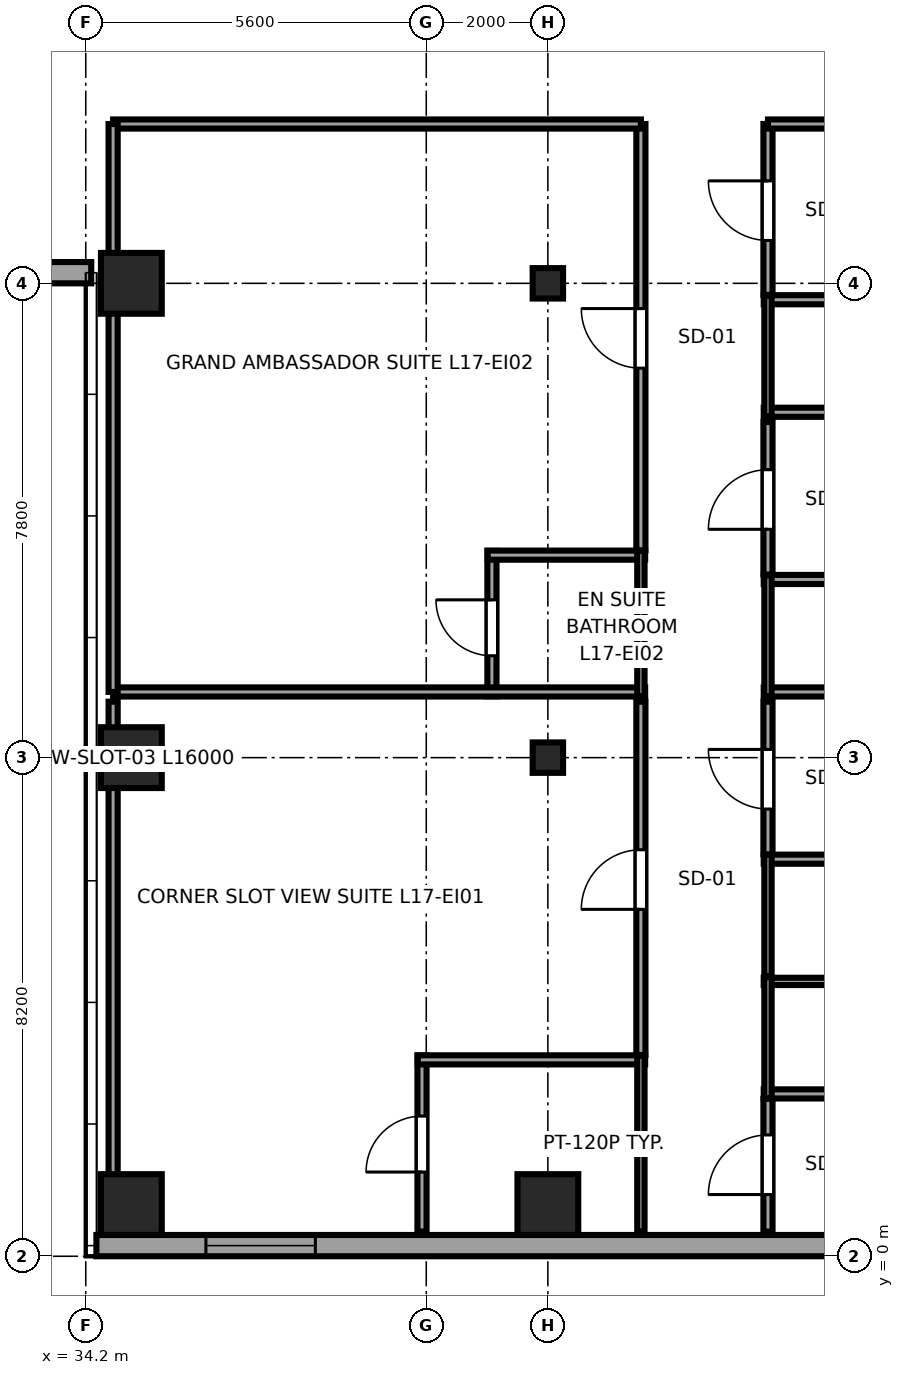
"""IFC4 building model, lengths in metres.
Left out: names, types, materials, properties, quantities, classifications, styles, units other than length and angle.
Written with IfcOpenShell. Run it as: python <this file> out.ifc"""

import sys

from ifc_helpers import new_model, si_unit, direction, frame, frame_2d, origin, origin_2d, place, context, subcontext, project, spatial, rectangle, i_section, extrude, source, transform, mapped, element, fill, save


model = new_model("IFC4")
c1 = context("Model", 3, precision=1e-05, world=origin(), true_north=direction((0.0, 1.0)))
c2 = subcontext(c1, "Body", "Model", "MODEL_VIEW")
j1 = project(units=[si_unit("LENGTHUNIT", "METRE"), si_unit("PLANEANGLEUNIT", "RADIAN")], contexts=[c1])
p1 = place(None, origin())
s1 = spatial("IfcSite", under=j1, at=p1, CompositionType="ELEMENT")
p2 = place(p1, origin())
s2 = spatial("IfcBuilding", under=s1, at=p2, CompositionType="ELEMENT")
p3 = place(p2, frame((0.0, 0.0, 71.05)))
s3 = spatial("IfcBuildingStorey", under=s2, at=p3, CompositionType="ELEMENT", Elevation=71.05)
m1 = source(origin(), c2, "Body", "SweptSolid", [
    extrude(rectangle(XDim=1.0, YDim=1.0, at=origin_2d()), origin(), (0.0, 0.0, 1.0), 3.55),
])
for number, where, z_axis, x_axis in (
    (1, (34.95, 0.85, 0.0), (0.0, 0.0, 1.0), (1.0, 0.0, 0.0)),
    (2, (34.95, 8.2, 0.0), (0.0, 0.0, 1.0), (1.0, 0.0, 0.0)),
    (3, (34.95, 16.0, 0.0), (0.0, 0.0, 1.0), (1.0, 0.0, 0.0)),
    (4, (41.8, 0.85, 0.0), (0.0, 0.0, 1.0), (1.0, 0.0, 0.0)),
):
    element("IfcColumn", number, at=place(p3, frame(where, z_axis=z_axis, x_axis=x_axis)), inside=s3, PredefinedType="COLUMN", context=c2, shape_type="MappedRepresentation", body=[
        mapped(m1, transform((0.0, 0.0, 0.0), x_axis=(1.0, 0.0, 0.0), y_axis=(0.0, 1.0, 0.0), z_axis=(0.0, 0.0, 1.0), scale=1.0)),
    ])
m2 = source(origin(), c2, "Body", "SweptSolid", [
    extrude(i_section(OverallWidth=0.5, OverallDepth=0.5, WebThickness=0.028, FlangeThickness=0.045, at=origin_2d()), origin(), (0.0, 0.0, 1.0), 3.55),
])
for number, where, z_axis, x_axis in (
    (5, (41.8, 8.2, 0.0), (0.0, 0.0, 1.0), (1.0, 0.0, 0.0)),
    (6, (41.8, 16.0, 0.0), (0.0, 0.0, 1.0), (1.0, 0.0, 0.0)),
):
    element("IfcColumn", number, at=place(p3, frame(where, z_axis=z_axis, x_axis=x_axis)), inside=s3, PredefinedType="COLUMN", context=c2, shape_type="MappedRepresentation", body=[
        mapped(m2, transform((0.0, 0.0, 0.0), x_axis=(1.0, 0.0, 0.0), y_axis=(0.0, 1.0, 0.0), z_axis=(0.0, 0.0, 1.0), scale=1.0)),
    ])
p4 = place(p3, frame((22.71, 16.175, 0.0), z_axis=(0.0, 0.0, 1.0), x_axis=(1.0, 0.0, 0.0)))
e7 = element("IfcWall", 7, at=p4, inside=s3, PredefinedType="SOLIDWALL", context=c2, shape_type="SweptSolid", body=[
    extrude(rectangle(XDim=11.58, YDim=0.35, at=frame_2d((5.79, 0.0))), origin(), (0.0, 0.0, 1.0), 2.748),
])
p5 = place(p4, frame((2.295, 0.0, 0.68)))
e8 = element("IfcOpeningElement", 8, at=p5, cuts=e7, PredefinedType="OPENING", context=c2, shape_type="SweptSolid", body=[
    extrude(rectangle(XDim=1.8, YDim=1.85, at=frame_2d((0.9, 0.925))), frame((0.0, 0.185, 0.0), z_axis=(0.0, -1.0, 0.0), x_axis=(1.0, 0.0, 0.0)), (0.0, 0.0, 1.0), 0.37),
])
p6 = place(p4, frame((7.485, 0.0, 0.68)))
e9 = element("IfcOpeningElement", 9, at=p6, cuts=e7, PredefinedType="OPENING", context=c2, shape_type="SweptSolid", body=[
    extrude(rectangle(XDim=1.8, YDim=1.85, at=frame_2d((0.9, 0.925))), frame((0.0, 0.185, 0.0), z_axis=(0.0, -1.0, 0.0), x_axis=(1.0, 0.0, 0.0)), (0.0, 0.0, 1.0), 0.37),
])
p7 = place(p3, frame((34.375, 0.175, 0.0), z_axis=(0.0, 0.0, 1.0), x_axis=(1.0, 0.0, 0.0)))
e10 = element("IfcWall", 10, at=p7, inside=s3, PredefinedType="SOLIDWALL", context=c2, shape_type="SweptSolid", body=[
    extrude(rectangle(XDim=18.008, YDim=0.35, at=frame_2d((9.004, 0.0))), origin(), (0.0, 0.0, 1.0), 3.37),
])
p8 = place(p7, frame((1.801, 0.0, 0.68)))
e11 = element("IfcOpeningElement", 11, at=p8, cuts=e10, PredefinedType="OPENING", context=c2, shape_type="SweptSolid", body=[
    extrude(rectangle(XDim=1.8, YDim=1.85, at=frame_2d((0.9, 0.925))), frame((0.0, 0.185, 0.0), z_axis=(0.0, -1.0, 0.0), x_axis=(1.0, 0.0, 0.0)), (0.0, 0.0, 1.0), 0.37),
])
p9 = place(p7, frame((12.825, 0.0, 0.62)))
e12 = element("IfcOpeningElement", 12, at=p9, cuts=e10, PredefinedType="OPENING", context=c2, shape_type="SweptSolid", body=[
    extrude(rectangle(XDim=1.5, YDim=1.55, at=frame_2d((0.75, 0.775))), frame((0.0, 0.185, 0.0), z_axis=(0.0, -1.0, 0.0), x_axis=(1.0, 0.0, 0.0)), (0.0, 0.0, 1.0), 0.37),
])
p10 = place(p3, frame((39.73, 0.405, 0.0), z_axis=(0.0, 0.0, 1.0), x_axis=(0.0, 1.0, 0.0)))
e13 = element("IfcWall", 13, at=p10, inside=s3, PredefinedType="PARTITIONING", context=c2, shape_type="SweptSolid", body=[
    extrude(rectangle(XDim=2.895, YDim=0.15, at=frame_2d((1.448, 0.0))), origin(), (0.0, 0.0, 1.0), 3.37),
])
p11 = place(p10, frame((0.98, 0.0, 0.0)))
e14 = element("IfcOpeningElement", 14, at=p11, cuts=e13, PredefinedType="OPENING", context=c2, shape_type="SweptSolid", body=[
    extrude(rectangle(XDim=0.92, YDim=2.01, at=frame_2d((0.46, 1.005))), frame((0.0, 0.085, 0.0), z_axis=(0.0, -1.0, 0.0), x_axis=(1.0, 0.0, 0.0)), (0.0, 0.0, 1.0), 0.17),
])
p12 = place(p3, frame((39.66, 3.23, 0.0), z_axis=(0.0, 0.0, 1.0), x_axis=(1.0, 0.0, 0.0)))
e15 = element("IfcWall", 15, at=p12, inside=s3, PredefinedType="PARTITIONING", context=c2, shape_type="SweptSolid", body=[
    extrude(rectangle(XDim=3.74, YDim=0.15, at=frame_2d((1.87, 0.0))), origin(), (0.0, 0.0, 1.0), 3.37),
])
p13 = place(p3, frame((43.33, 0.405, 0.0), z_axis=(0.0, 0.0, 1.0), x_axis=(0.0, 1.0, 0.0)))
e16 = element("IfcWall", 16, at=p13, inside=s3, PredefinedType="PLUMBINGWALL", context=c2, shape_type="SweptSolid", body=[
    extrude(rectangle(XDim=2.895, YDim=0.12, at=frame_2d((1.448, 0.0))), origin(), (0.0, 0.0, 1.0), 3.37),
])
p14 = place(p3, frame((40.88, 9.21, 0.0), z_axis=(0.0, 0.0, 1.0), x_axis=(0.0, 1.0, 0.0)))
e17 = element("IfcWall", 17, at=p14, inside=s3, PredefinedType="PARTITIONING", context=c2, shape_type="SweptSolid", body=[
    extrude(rectangle(XDim=2.39, YDim=0.15, at=frame_2d((1.195, 0.0))), origin(), (0.0, 0.0, 1.0), 3.37),
])
p15 = place(p14, frame((0.665, 0.0, 0.0)))
e18 = element("IfcOpeningElement", 18, at=p15, cuts=e17, PredefinedType="OPENING", context=c2, shape_type="SweptSolid", body=[
    extrude(rectangle(XDim=0.92, YDim=2.01, at=frame_2d((0.46, 1.005))), frame((0.0, 0.085, 0.0), z_axis=(0.0, -1.0, 0.0), x_axis=(1.0, 0.0, 0.0)), (0.0, 0.0, 1.0), 0.17),
])
p16 = place(p3, frame((34.65, 9.28, 0.0), z_axis=(0.0, 0.0, 1.0), x_axis=(1.0, 0.0, 0.0)))
e19 = element("IfcWall", 19, at=p16, inside=s3, PredefinedType="PARTITIONING", context=c2, shape_type="SweptSolid", body=[
    extrude(rectangle(XDim=8.75, YDim=0.15, at=frame_2d((4.375, 0.0))), origin(), (0.0, 0.0, 1.0), 3.37),
])
p17 = place(p3, frame((40.81, 11.53, 0.0), z_axis=(0.0, 0.0, 1.0), x_axis=(1.0, 0.0, 0.0)))
e20 = element("IfcWall", 20, at=p17, inside=s3, PredefinedType="PARTITIONING", context=c2, shape_type="SweptSolid", body=[
    extrude(rectangle(XDim=2.59, YDim=0.15, at=frame_2d((1.295, 0.0))), origin(), (0.0, 0.0, 1.0), 3.37),
])
p18 = place(p3, frame((43.33, 9.21, 0.0), z_axis=(0.0, 0.0, 1.0), x_axis=(0.0, 1.0, 0.0)))
e21 = element("IfcWall", 21, at=p18, inside=s3, PredefinedType="PLUMBINGWALL", context=c2, shape_type="SweptSolid", body=[
    extrude(rectangle(XDim=2.39, YDim=0.12, at=frame_2d((1.195, 0.0))), origin(), (0.0, 0.0, 1.0), 3.37),
])
p19 = place(p3, frame((45.35, 2.67, 0.0), z_axis=(0.0, 0.0, 1.0), x_axis=(1.0, 0.0, 0.0)))
e22 = element("IfcWall", 22, at=p19, inside=s3, PredefinedType="PARTITIONING", context=c2, shape_type="SweptSolid", body=[
    extrude(rectangle(XDim=2.59, YDim=0.15, at=frame_2d((1.295, 0.0))), origin(), (0.0, 0.0, 1.0), 3.37),
])
p20 = place(p3, frame((45.35, 4.52, 0.0), z_axis=(0.0, 0.0, 1.0), x_axis=(1.0, 0.0, 0.0)))
e23 = element("IfcWall", 23, at=p20, inside=s3, PredefinedType="PLUMBINGWALL", context=c2, shape_type="SweptSolid", body=[
    extrude(rectangle(XDim=2.59, YDim=0.12, at=frame_2d((1.295, 0.0))), origin(), (0.0, 0.0, 1.0), 3.37),
])
p21 = place(p3, frame((45.42, 2.6, 0.0), z_axis=(0.0, 0.0, 1.0), x_axis=(0.0, 1.0, 0.0)))
e24 = element("IfcWall", 24, at=p21, inside=s3, PredefinedType="PLUMBINGWALL", context=c2, shape_type="SweptSolid", body=[
    extrude(rectangle(XDim=1.99, YDim=0.12, at=frame_2d((0.995, 0.0))), origin(), (0.0, 0.0, 1.0), 3.37),
])
p22 = place(p3, frame((45.35, 6.53, 0.0), z_axis=(0.0, 0.0, 1.0), x_axis=(1.0, 0.0, 0.0)))
e25 = element("IfcWall", 25, at=p22, inside=s3, PredefinedType="PARTITIONING", context=c2, shape_type="SweptSolid", body=[
    extrude(rectangle(XDim=2.59, YDim=0.15, at=frame_2d((1.295, 0.0))), origin(), (0.0, 0.0, 1.0), 3.37),
])
p23 = place(p3, frame((45.42, 4.61, 0.0), z_axis=(0.0, 0.0, 1.0), x_axis=(0.0, 1.0, 0.0)))
e26 = element("IfcWall", 26, at=p23, inside=s3, PredefinedType="PLUMBINGWALL", context=c2, shape_type="SweptSolid", body=[
    extrude(rectangle(XDim=1.99, YDim=0.12, at=frame_2d((0.995, 0.0))), origin(), (0.0, 0.0, 1.0), 3.37),
])
p24 = place(p3, frame((45.35, 9.28, 0.0), z_axis=(0.0, 0.0, 1.0), x_axis=(1.0, 0.0, 0.0)))
e27 = element("IfcWall", 27, at=p24, inside=s3, PredefinedType="PARTITIONING", context=c2, shape_type="SweptSolid", body=[
    extrude(rectangle(XDim=11.245, YDim=0.15, at=frame_2d((5.623, 0.0))), origin(), (0.0, 0.0, 1.0), 3.37),
])
p25 = place(p3, frame((45.35, 11.13, 0.0), z_axis=(0.0, 0.0, 1.0), x_axis=(1.0, 0.0, 0.0)))
e28 = element("IfcWall", 28, at=p25, inside=s3, PredefinedType="PARTITIONING", context=c2, shape_type="SweptSolid", body=[
    extrude(rectangle(XDim=2.59, YDim=0.15, at=frame_2d((1.295, 0.0))), origin(), (0.0, 0.0, 1.0), 3.37),
])
p26 = place(p3, frame((45.42, 9.21, 0.0), z_axis=(0.0, 0.0, 1.0), x_axis=(0.0, 1.0, 0.0)))
e29 = element("IfcWall", 29, at=p26, inside=s3, PredefinedType="PLUMBINGWALL", context=c2, shape_type="SweptSolid", body=[
    extrude(rectangle(XDim=1.99, YDim=0.12, at=frame_2d((0.995, 0.0))), origin(), (0.0, 0.0, 1.0), 3.37),
])
p27 = place(p3, frame((45.35, 13.88, 0.0), z_axis=(0.0, 0.0, 1.0), x_axis=(1.0, 0.0, 0.0)))
e30 = element("IfcWall", 30, at=p27, inside=s3, PredefinedType="PARTITIONING", context=c2, shape_type="SweptSolid", body=[
    extrude(rectangle(XDim=11.245, YDim=0.15, at=frame_2d((5.623, 0.0))), origin(), (0.0, 0.0, 1.0), 3.37),
])
p28 = place(p3, frame((45.35, 15.73, 0.0), z_axis=(0.0, 0.0, 1.0), x_axis=(1.0, 0.0, 0.0)))
e31 = element("IfcWall", 31, at=p28, inside=s3, PredefinedType="PARTITIONING", context=c2, shape_type="SweptSolid", body=[
    extrude(rectangle(XDim=2.59, YDim=0.15, at=frame_2d((1.295, 0.0))), origin(), (0.0, 0.0, 1.0), 3.37),
])
p29 = place(p3, frame((45.42, 13.81, 0.0), z_axis=(0.0, 0.0, 1.0), x_axis=(0.0, 1.0, 0.0)))
e32 = element("IfcWall", 32, at=p29, inside=s3, PredefinedType="PLUMBINGWALL", context=c2, shape_type="SweptSolid", body=[
    extrude(rectangle(XDim=1.99, YDim=0.12, at=frame_2d((0.995, 0.0))), origin(), (0.0, 0.0, 1.0), 3.37),
])
p30 = place(p3, frame((43.33, 3.31, 0.0), z_axis=(0.0, 0.0, 1.0), x_axis=(0.0, 1.0, 0.0)))
e33 = element("IfcWall", 33, at=p30, inside=s3, PredefinedType="PARTITIONING", context=c2, shape_type="SweptSolid", body=[
    extrude(rectangle(XDim=5.81, YDim=0.15, at=frame_2d((2.905, 0.0))), origin(), (0.0, 0.0, 1.0), 3.37),
])
p31 = place(p30, frame((2.395, 0.0, 0.0)))
e34 = element("IfcOpeningElement", 34, at=p31, cuts=e33, PredefinedType="OPENING", context=c2, shape_type="SweptSolid", body=[
    extrude(rectangle(XDim=0.98, YDim=2.12, at=frame_2d((0.49, 1.06))), frame((0.0, 0.085, 0.0), z_axis=(0.0, -1.0, 0.0), x_axis=(1.0, 0.0, 0.0)), (0.0, 0.0, 1.0), 0.17),
])
p32 = place(p3, frame((34.65, 0.405, 0.0), z_axis=(0.0, 0.0, 1.0), x_axis=(0.0, 1.0, 0.0)))
e35 = element("IfcWall", 35, at=p32, inside=s3, PredefinedType="PARTITIONING", context=c2, shape_type="SweptSolid", body=[
    extrude(rectangle(XDim=8.715, YDim=0.15, at=frame_2d((4.357, 0.0))), origin(), (0.0, 0.0, 1.0), 3.37),
])
p33 = place(p3, frame((43.33, 11.61, 0.0), z_axis=(0.0, 0.0, 1.0), x_axis=(0.0, 1.0, 0.0)))
e36 = element("IfcWall", 36, at=p33, inside=s3, PredefinedType="PARTITIONING", context=c2, shape_type="SweptSolid", body=[
    extrude(rectangle(XDim=7.01, YDim=0.15, at=frame_2d((3.505, 0.0))), origin(), (0.0, 0.0, 1.0), 3.37),
])
p34 = place(p33, frame((2.995, 0.0, 0.0)))
e37 = element("IfcOpeningElement", 37, at=p34, cuts=e36, PredefinedType="OPENING", context=c2, shape_type="SweptSolid", body=[
    extrude(rectangle(XDim=0.98, YDim=2.12, at=frame_2d((0.49, 1.06))), frame((0.0, 0.085, 0.0), z_axis=(0.0, -1.0, 0.0), x_axis=(1.0, 0.0, 0.0)), (0.0, 0.0, 1.0), 0.17),
])
p35 = place(p3, frame((34.65, 18.62, 0.0), z_axis=(0.0, 0.0, 1.0), x_axis=(1.0, 0.0, 0.0)))
e38 = element("IfcWall", 38, at=p35, inside=s3, PredefinedType="PARTITIONING", context=c2, shape_type="SweptSolid", body=[
    extrude(rectangle(XDim=8.68, YDim=0.15, at=frame_2d((4.34, 0.0))), origin(), (0.0, 0.0, 1.0), 3.37),
])
p36 = place(p3, frame((34.65, 9.28, 0.0), z_axis=(0.0, 0.0, 1.0), x_axis=(0.0, 1.0, 0.0)))
e39 = element("IfcWall", 39, at=p36, inside=s3, PredefinedType="PARTITIONING", context=c2, shape_type="SweptSolid", body=[
    extrude(rectangle(XDim=9.34, YDim=0.15, at=frame_2d((4.67, 0.0))), origin(), (0.0, 0.0, 1.0), 3.37),
])
p37 = place(p3, frame((45.42, 0.405, 0.0), z_axis=(0.0, 0.0, 1.0), x_axis=(0.0, 1.0, 0.0)))
e40 = element("IfcWall", 40, at=p37, inside=s3, PredefinedType="PARTITIONING", context=c2, shape_type="SweptSolid", body=[
    extrude(rectangle(XDim=2.185, YDim=0.15, at=frame_2d((1.093, 0.0))), origin(), (0.0, 0.0, 1.0), 3.37),
])
p38 = place(p37, frame((0.61, 0.0, 0.0)))
e41 = element("IfcOpeningElement", 41, at=p38, cuts=e40, PredefinedType="OPENING", context=c2, shape_type="SweptSolid", body=[
    extrude(rectangle(XDim=0.98, YDim=2.12, at=frame_2d((0.49, 1.06))), frame((0.0, 0.085, 0.0), z_axis=(0.0, -1.0, 0.0), x_axis=(1.0, 0.0, 0.0)), (0.0, 0.0, 1.0), 0.17),
])
p39 = place(p3, frame((45.42, 6.61, 0.0), z_axis=(0.0, 0.0, 1.0), x_axis=(0.0, 1.0, 0.0)))
e42 = element("IfcWall", 42, at=p39, inside=s3, PredefinedType="PARTITIONING", context=c2, shape_type="SweptSolid", body=[
    extrude(rectangle(XDim=2.51, YDim=0.15, at=frame_2d((1.255, 0.0))), origin(), (0.0, 0.0, 1.0), 3.37),
])
p40 = place(p39, frame((0.745, 0.0, 0.0)))
e43 = element("IfcOpeningElement", 43, at=p40, cuts=e42, PredefinedType="OPENING", context=c2, shape_type="SweptSolid", body=[
    extrude(rectangle(XDim=0.98, YDim=2.12, at=frame_2d((0.49, 1.06))), frame((0.0, 0.085, 0.0), z_axis=(0.0, -1.0, 0.0), x_axis=(1.0, 0.0, 0.0)), (0.0, 0.0, 1.0), 0.17),
])
p41 = place(p3, frame((45.42, 11.21, 0.0), z_axis=(0.0, 0.0, 1.0), x_axis=(0.0, 1.0, 0.0)))
e44 = element("IfcWall", 44, at=p41, inside=s3, PredefinedType="PARTITIONING", context=c2, shape_type="SweptSolid", body=[
    extrude(rectangle(XDim=2.51, YDim=0.15, at=frame_2d((1.255, 0.0))), origin(), (0.0, 0.0, 1.0), 3.37),
])
p42 = place(p41, frame((0.745, 0.0, 0.0)))
e45 = element("IfcOpeningElement", 45, at=p42, cuts=e44, PredefinedType="OPENING", context=c2, shape_type="SweptSolid", body=[
    extrude(rectangle(XDim=0.98, YDim=2.12, at=frame_2d((0.49, 1.06))), frame((0.0, 0.085, 0.0), z_axis=(0.0, -1.0, 0.0), x_axis=(1.0, 0.0, 0.0)), (0.0, 0.0, 1.0), 0.17),
])
p43 = place(p3, frame((45.42, 15.81, 0.0), z_axis=(0.0, 0.0, 1.0), x_axis=(0.0, 1.0, 0.0)))
e46 = element("IfcWall", 46, at=p43, inside=s3, PredefinedType="PARTITIONING", context=c2, shape_type="SweptSolid", body=[
    extrude(rectangle(XDim=2.81, YDim=0.15, at=frame_2d((1.405, 0.0))), origin(), (0.0, 0.0, 1.0), 3.37),
])
p44 = place(p43, frame((0.895, 0.0, 0.0)))
e47 = element("IfcOpeningElement", 47, at=p44, cuts=e46, PredefinedType="OPENING", context=c2, shape_type="SweptSolid", body=[
    extrude(rectangle(XDim=0.98, YDim=2.12, at=frame_2d((0.49, 1.06))), frame((0.0, 0.085, 0.0), z_axis=(0.0, -1.0, 0.0), x_axis=(1.0, 0.0, 0.0)), (0.0, 0.0, 1.0), 0.17),
])
p45 = place(p3, frame((45.42, 18.62, 0.0), z_axis=(0.0, 0.0, 1.0), x_axis=(1.0, 0.0, 0.0)))
e48 = element("IfcWall", 48, at=p45, inside=s3, PredefinedType="PARTITIONING", context=c2, shape_type="SweptSolid", body=[
    extrude(rectangle(XDim=11.175, YDim=0.15, at=frame_2d((5.587, 0.0))), origin(), (0.0, 0.0, 1.0), 3.37),
])
m3 = source(origin(), c2, "Body", "SweptSolid", [
    extrude(rectangle(XDim=1.8, YDim=1.85, at=frame_2d((0.9, 0.925))), frame((0.0, 0.09, 0.0), z_axis=(0.0, -1.0, 0.0), x_axis=(1.0, 0.0, 0.0)), (0.0, 0.0, 1.0), 0.06),
])
p46 = place(p8, origin())
e49 = element("IfcWindow", 49, at=p46, inside=s3, PartitioningType="TRIPLE_PANEL_HORIZONTAL", PredefinedType="WINDOW", context=c2, shape_type="MappedRepresentation", body=[
    mapped(m3, transform((0.0, 0.0, 0.0), x_axis=(1.0, 0.0, 0.0), y_axis=(0.0, 1.0, 0.0), z_axis=(0.0, 0.0, 1.0), scale=1.0)),
])
fill(e11, e49)
m4 = source(origin(), c2, "Body", "SweptSolid", [
    extrude(rectangle(XDim=0.92, YDim=2.01, at=frame_2d((0.46, 1.005))), frame((0.0, 0.025, 0.0), z_axis=(0.0, -1.0, 0.0), x_axis=(1.0, 0.0, 0.0)), (0.0, 0.0, 1.0), 0.05),
])
p47 = place(p11, origin())
e50 = element("IfcDoor", 50, at=p47, inside=s3, OperationType="SINGLE_SWING_LEFT", PredefinedType="DOOR", context=c2, shape_type="MappedRepresentation", body=[
    mapped(m4, transform((0.0, 0.0, 0.0), x_axis=(1.0, 0.0, 0.0), y_axis=(0.0, 1.0, 0.0), z_axis=(0.0, 0.0, 1.0), scale=1.0)),
])
fill(e14, e50)
p48 = place(p15, origin())
e51 = element("IfcDoor", 51, at=p48, inside=s3, OperationType="SINGLE_SWING_RIGHT", PredefinedType="DOOR", context=c2, shape_type="MappedRepresentation", body=[
    mapped(m4, transform((0.0, 0.0, 0.0), x_axis=(1.0, 0.0, 0.0), y_axis=(0.0, 1.0, 0.0), z_axis=(0.0, 0.0, 1.0), scale=1.0)),
])
fill(e18, e51)
m5 = source(origin(), c2, "Body", "SweptSolid", [
    extrude(rectangle(XDim=0.98, YDim=2.12, at=frame_2d((0.49, 1.06))), frame((0.0, 0.025, 0.0), z_axis=(0.0, -1.0, 0.0), x_axis=(1.0, 0.0, 0.0)), (0.0, 0.0, 1.0), 0.05),
])
p49 = place(p31, origin())
e52 = element("IfcDoor", 52, at=p49, inside=s3, OperationType="SINGLE_SWING_LEFT", PredefinedType="DOOR", context=c2, shape_type="MappedRepresentation", body=[
    mapped(m5, transform((0.0, 0.0, 0.0), x_axis=(1.0, 0.0, 0.0), y_axis=(0.0, 1.0, 0.0), z_axis=(0.0, 0.0, 1.0), scale=1.0)),
])
fill(e34, e52)
p50 = place(p34, origin())
e53 = element("IfcDoor", 53, at=p50, inside=s3, OperationType="SINGLE_SWING_RIGHT", PredefinedType="DOOR", context=c2, shape_type="MappedRepresentation", body=[
    mapped(m5, transform((0.0, 0.0, 0.0), x_axis=(1.0, 0.0, 0.0), y_axis=(0.0, 1.0, 0.0), z_axis=(0.0, 0.0, 1.0), scale=1.0)),
])
fill(e37, e53)
p51 = place(p38, origin())
e54 = element("IfcDoor", 54, at=p51, inside=s3, OperationType="SINGLE_SWING_LEFT", PredefinedType="DOOR", context=c2, shape_type="MappedRepresentation", body=[
    mapped(m5, transform((0.0, 0.0, 0.0), x_axis=(1.0, 0.0, 0.0), y_axis=(0.0, 1.0, 0.0), z_axis=(0.0, 0.0, 1.0), scale=1.0)),
])
fill(e41, e54)
p52 = place(p40, origin())
e55 = element("IfcDoor", 55, at=p52, inside=s3, OperationType="SINGLE_SWING_RIGHT", PredefinedType="DOOR", context=c2, shape_type="MappedRepresentation", body=[
    mapped(m5, transform((0.0, 0.0, 0.0), x_axis=(1.0, 0.0, 0.0), y_axis=(0.0, 1.0, 0.0), z_axis=(0.0, 0.0, 1.0), scale=1.0)),
])
fill(e43, e55)
p53 = place(p42, origin())
e56 = element("IfcDoor", 56, at=p53, inside=s3, OperationType="SINGLE_SWING_LEFT", PredefinedType="DOOR", context=c2, shape_type="MappedRepresentation", body=[
    mapped(m5, transform((0.0, 0.0, 0.0), x_axis=(1.0, 0.0, 0.0), y_axis=(0.0, 1.0, 0.0), z_axis=(0.0, 0.0, 1.0), scale=1.0)),
])
fill(e45, e56)
p54 = place(p44, origin())
e57 = element("IfcDoor", 57, at=p54, inside=s3, OperationType="SINGLE_SWING_RIGHT", PredefinedType="DOOR", context=c2, shape_type="MappedRepresentation", body=[
    mapped(m5, transform((0.0, 0.0, 0.0), x_axis=(1.0, 0.0, 0.0), y_axis=(0.0, 1.0, 0.0), z_axis=(0.0, 0.0, 1.0), scale=1.0)),
])
fill(e47, e57)
save(model, sys.argv[1])
